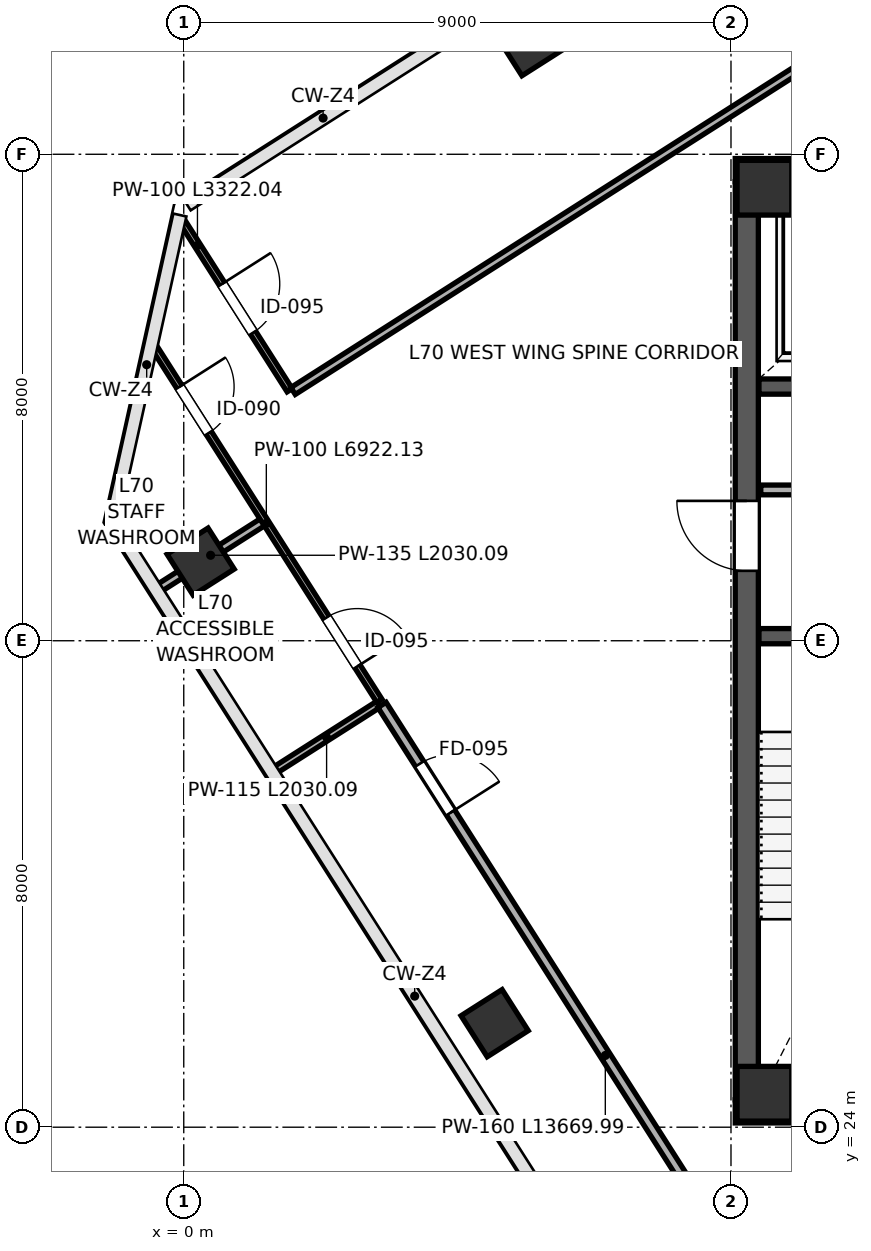
"""IFC4 building model, lengths in metres.
Left out: names, types, materials, properties, quantities, classifications, styles, units other than length and angle.
Written with IfcOpenShell. Run it as: python <this file> out.ifc"""

import sys

from ifc_helpers import new_model, si_unit, direction, frame, frame_2d, origin, origin_2d, place, context, subcontext, project, spatial, rectangle, extrude, source, transform, mapped, element, fill, save


model = new_model("IFC4")
c1 = context("Model", 3, precision=1e-05, world=origin(), true_north=direction((0.0, 1.0)))
c2 = subcontext(c1, "Body", "Model", "MODEL_VIEW")
j1 = project(units=[si_unit("LENGTHUNIT", "METRE"), si_unit("PLANEANGLEUNIT", "RADIAN")], contexts=[c1])
p1 = place(None, origin())
s1 = spatial("IfcSite", under=j1, at=p1, CompositionType="ELEMENT")
p2 = place(p1, origin())
s2 = spatial("IfcBuilding", under=s1, at=p2, CompositionType="ELEMENT")
p3 = place(p2, frame((0.0, 0.0, 311.4)))
s3 = spatial("IfcBuildingStorey", under=s2, at=p3, CompositionType="ELEMENT", Elevation=311.4)
m1 = source(origin(), c2, "Body", "SweptSolid", [
    extrude(rectangle(XDim=0.9, YDim=0.9, at=origin_2d()), origin(), (0.0, 0.0, 1.0), 4.199),
])
for number, where, z_axis, x_axis in (
    (1, (9.55, 24.55, 0.001), (0.0, 0.0, 1.0), (1.0, 0.0, 0.0)),
    (2, (9.55, 39.45, 0.001), (0.0, 0.0, 1.0), (1.0, 0.0, 0.0)),
):
    element("IfcColumn", number, at=place(p3, frame(where, z_axis=z_axis, x_axis=x_axis)), inside=s3, PredefinedType="COLUMN", context=c2, shape_type="MappedRepresentation", body=[
        mapped(m1, transform((0.0, 0.0, 0.0), scale=1.0)),
    ])
m2 = source(origin(), c2, "Body", "SweptSolid", [
    extrude(rectangle(XDim=0.8, YDim=0.8, at=origin_2d()), origin(), (0.0, 0.0, 1.0), 4.199),
])
for number, where, z_axis, x_axis in (
    (3, (0.277, 33.301, 0.001), (0.0, 0.0, 1.0), (-0.537, 0.843, 0.0)),
    (4, (5.113, 25.71, 0.001), (0.0, 0.0, 1.0), (-0.537, 0.843, 0.0)),
):
    element("IfcColumn", number, at=place(p3, frame(where, z_axis=z_axis, x_axis=x_axis)), inside=s3, PredefinedType="COLUMN", context=c2, shape_type="MappedRepresentation", body=[
        mapped(m2, transform((0.0, 0.0, 0.0), scale=1.0)),
    ])
m3 = source(origin(), c2, "Body", "SweptSolid", [
    extrude(rectangle(XDim=0.9, YDim=0.9, at=origin_2d()), origin(), (0.0, 0.0, 1.0), 4.199),
])
p4 = place(p3, frame((5.699, 41.913, 0.001), z_axis=(0.0, 0.0, 1.0), x_axis=(-0.537299608347, 0.843391445813, 0.0)))
e5 = element("IfcColumn", 5, at=p4, inside=s3, PredefinedType="COLUMN", context=c2, shape_type="MappedRepresentation", body=[
    mapped(m3, transform((0.0, 0.0, 0.0), scale=1.0)),
])
p5 = place(p3, frame((9.26, 24.45, 0.0), z_axis=(0.0, 0.0, 1.0), x_axis=(0.0, 1.0, 0.0)))
e6 = element("IfcWall", 6, at=p5, inside=s3, PredefinedType="SHEAR", context=c2, shape_type="SweptSolid", body=[
    extrude(rectangle(XDim=15.1, YDim=0.38, at=frame_2d((7.55, 0.0))), origin(), (0.0, 0.0, 1.0), 3.96),
])
p6 = place(p5, frame((8.7, 0.0, 0.0)))
e7 = element("IfcOpeningElement", 7, at=p6, cuts=e6, PredefinedType="OPENING", context=c2, shape_type="SweptSolid", body=[
    extrude(rectangle(XDim=1.15, YDim=2.2, at=frame_2d((0.575, 1.1))), frame((0.0, 0.2, 0.0), z_axis=(0.0, -1.0, 0.0), x_axis=(1.0, 0.0, 0.0)), (0.0, 0.0, 1.0), 0.4),
])
for number, where, z_axis, x_axis in (
    (8, (9.07, 24.26, 0.0), (0.0, 0.0, 1.0), (1.0, 0.0, 0.0)),
    (9, (9.07, 39.74, 0.0), (0.0, 0.0, 1.0), (1.0, 0.0, 0.0)),
):
    element("IfcWall", number, at=place(p3, frame(where, z_axis=z_axis, x_axis=x_axis)), inside=s3, PredefinedType="SHEAR", context=c2, shape_type="SweptSolid", body=[
        extrude(rectangle(XDim=17.86, YDim=0.38, at=frame_2d((8.93, 0.0))), origin(), (0.0, 0.0, 1.0), 3.96),
    ])
p7 = place(p3, frame((9.46, 32.075, 0.0), z_axis=(0.0, 0.0, 1.0), x_axis=(1.0, 0.0, 0.0)))
e10 = element("IfcWall", 10, at=p7, inside=s3, PredefinedType="SHEAR", context=c2, shape_type="SweptSolid", body=[
    extrude(rectangle(XDim=3.29, YDim=0.25, at=frame_2d((1.645, 0.0))), origin(), (0.0, 0.0, 1.0), 3.96),
])
p8 = place(p3, frame((9.46, 36.18, 0.0), z_axis=(0.0, 0.0, 1.0), x_axis=(1.0, 0.0, 0.0)))
e11 = element("IfcWall", 11, at=p8, inside=s3, PredefinedType="SHEAR", context=c2, shape_type="SweptSolid", body=[
    extrude(rectangle(XDim=3.79, YDim=0.25, at=frame_2d((1.895, 0.0))), origin(), (0.0, 0.0, 1.0), 3.96),
])
p9 = place(p8, frame((2.62, 0.0, 0.0)))
e12 = element("IfcOpeningElement", 12, at=p9, cuts=e11, PredefinedType="OPENING", context=c2, shape_type="SweptSolid", body=[
    extrude(rectangle(XDim=0.85, YDim=2.1, at=frame_2d((0.425, 1.05))), frame((0.0, 0.135, 0.0), z_axis=(0.0, -1.0, 0.0), x_axis=(1.0, 0.0, 0.0)), (0.0, 0.0, 1.0), 0.27),
])
p10 = place(p8, frame((0.85, 0.0, 0.0)))
e13 = element("IfcOpeningElement", 13, at=p10, cuts=e11, PredefinedType="OPENING", context=c2, shape_type="SweptSolid", body=[
    extrude(rectangle(XDim=1.3, YDim=2.25, at=frame_2d((0.65, 1.125))), frame((0.0, 0.135, 0.0), z_axis=(0.0, -1.0, 0.0), x_axis=(1.0, 0.0, 0.0)), (0.0, 0.0, 1.0), 0.27),
])
p11 = place(p3, frame((9.49, 34.48, 0.0), z_axis=(0.0, 0.0, 1.0), x_axis=(1.0, 0.0, 0.0)))
e14 = element("IfcWall", 14, at=p11, inside=s3, PredefinedType="PARTITIONING", context=c2, shape_type="SweptSolid", body=[
    extrude(rectangle(XDim=3.7, YDim=0.16, at=frame_2d((1.85, 0.0))), origin(), (0.0, 0.0, 1.0), 3.96),
])
p12 = place(p11, frame((1.15, 0.0, 0.0)))
e15 = element("IfcOpeningElement", 15, at=p12, cuts=e14, PredefinedType="OPENING", context=c2, shape_type="SweptSolid", body=[
    extrude(rectangle(XDim=0.9, YDim=2.15, at=frame_2d((0.45, 1.075))), frame((0.0, 0.09, 0.0), z_axis=(0.0, -1.0, 0.0), x_axis=(1.0, 0.0, 0.0)), (0.0, 0.0, 1.0), 0.18),
])
p13 = place(p3, frame((-0.414, 32.86, 0.0), z_axis=(0.0, 0.0, 1.0), x_axis=(0.843468317829, 0.5371789244, 0.0)))
e16 = element("IfcWall", 16, at=p13, inside=s3, PredefinedType="PARTITIONING", context=c2, shape_type="SweptSolid", body=[
    extrude(rectangle(XDim=2.03, YDim=0.135, at=frame_2d((1.015, 0.0))), origin(), (0.0, 0.0, 1.0), 3.295),
])
p14 = place(p3, frame((1.493, 29.866, 0.0), z_axis=(0.0, 0.0, 1.0), x_axis=(0.843433611632, 0.537233415537, 0.0)))
e17 = element("IfcWall", 17, at=p14, inside=s3, PredefinedType="PARTITIONING", context=c2, shape_type="SweptSolid", body=[
    extrude(rectangle(XDim=2.03, YDim=0.115, at=frame_2d((1.015, 0.0))), origin(), (0.0, 0.0, 1.0), 3.295),
])
p15 = place(p3, frame((-0.502, 36.85, 0.0), z_axis=(0.0, 0.0, 1.0), x_axis=(0.537309039539, -0.843385437407, 0.0)))
e18 = element("IfcWall", 18, at=p15, inside=s3, PredefinedType="PARTITIONING", context=c2, shape_type="SweptSolid", body=[
    extrude(rectangle(XDim=6.922, YDim=0.1, at=frame_2d((3.461, 0.0))), origin(), (0.0, 0.0, 1.0), 3.96),
])
p16 = place(p15, frame((0.8, 0.0, 0.0)))
e19 = element("IfcOpeningElement", 19, at=p16, cuts=e18, PredefinedType="OPENING", context=c2, shape_type="SweptSolid", body=[
    extrude(rectangle(XDim=0.9, YDim=2.15, at=frame_2d((0.45, 1.075))), frame((0.0, 0.06, 0.0), z_axis=(0.0, -1.0, 0.0), x_axis=(1.0, 0.0, 0.0)), (0.0, 0.0, 1.0), 0.12),
])
p17 = place(p15, frame((5.3, 0.0, 0.0)))
e20 = element("IfcOpeningElement", 20, at=p17, cuts=e18, PredefinedType="OPENING", context=c2, shape_type="SweptSolid", body=[
    extrude(rectangle(XDim=0.95, YDim=2.15, at=frame_2d((0.475, 1.075))), frame((0.0, 0.06, 0.0), z_axis=(0.0, -1.0, 0.0), x_axis=(1.0, 0.0, 0.0)), (0.0, 0.0, 1.0), 0.12),
])
p18 = place(p3, frame((3.26, 30.945, 0.0), z_axis=(0.0, 0.0, 1.0), x_axis=(0.537307625317, -0.843386338386, 0.0)))
e21 = element("IfcWall", 21, at=p18, inside=s3, PredefinedType="PARTITIONING", context=c2, shape_type="SweptSolid", body=[
    extrude(rectangle(XDim=13.67, YDim=0.16, at=frame_2d((6.835, 0.0))), origin(), (0.0, 0.0, 1.0), 3.96),
])
p19 = place(p18, frame((1.15, 0.0, 0.0)))
e22 = element("IfcOpeningElement", 22, at=p19, cuts=e21, PredefinedType="OPENING", context=c2, shape_type="SweptSolid", body=[
    extrude(rectangle(XDim=0.95, YDim=2.15, at=frame_2d((0.475, 1.075))), frame((0.0, 0.09, 0.0), z_axis=(0.0, -1.0, 0.0), x_axis=(1.0, 0.0, 0.0)), (0.0, 0.0, 1.0), 0.18),
])
p20 = place(p3, frame((-0.042, 38.921, 0.0), z_axis=(0.0, 0.0, 1.0), x_axis=(0.537298651026, -0.843392055693, 0.0)))
e23 = element("IfcWall", 23, at=p20, inside=s3, PredefinedType="PARTITIONING", context=c2, shape_type="SweptSolid", body=[
    extrude(rectangle(XDim=3.322, YDim=0.1, at=frame_2d((1.661, 0.0))), origin(), (0.0, 0.0, 1.0), 3.96),
])
p21 = place(p20, frame((1.25, 0.0, 0.0)))
e24 = element("IfcOpeningElement", 24, at=p21, cuts=e23, PredefinedType="OPENING", context=c2, shape_type="SweptSolid", body=[
    extrude(rectangle(XDim=0.95, YDim=2.15, at=frame_2d((0.475, 1.075))), frame((0.0, 0.06, 0.0), z_axis=(0.0, -1.0, 0.0), x_axis=(1.0, 0.0, 0.0)), (0.0, 0.0, 1.0), 0.12),
])
p22 = place(p3, frame((1.798, 36.107, 0.0), z_axis=(0.0, 0.0, 1.0), x_axis=(0.843396745572, 0.537291289301, 0.0)))
e25 = element("IfcWall", 25, at=p22, inside=s3, PredefinedType="PARTITIONING", context=c2, shape_type="SweptSolid", body=[
    extrude(rectangle(XDim=17.17, YDim=0.135, at=frame_2d((8.585, 0.0))), origin(), (0.0, 0.0, 1.0), 3.96),
])
p23 = place(p3, frame((9.687, 17.004, 0.0), z_axis=(0.0, 0.0, 1.0), x_axis=(0.843392646996, 0.537297722862, 0.0)))
e26 = element("IfcWall", 26, at=p23, inside=s3, PredefinedType="PARTITIONING", context=c2, shape_type="SweptSolid", body=[
    extrude(rectangle(XDim=12.831, YDim=0.16, at=frame_2d((6.416, 0.0))), origin(), (0.0, 0.0, 1.0), 3.96),
])
m4 = source(origin(), c2, "Body", "SweptSolid", [
    extrude(rectangle(XDim=1.15, YDim=2.2, at=frame_2d((0.575, 1.1))), frame((0.0, 0.025, 0.0), z_axis=(0.0, -1.0, 0.0), x_axis=(1.0, 0.0, 0.0)), (0.0, 0.0, 1.0), 0.05),
])
p24 = place(p6, origin())
e27 = element("IfcDoor", 27, at=p24, inside=s3, OperationType="SINGLE_SWING_RIGHT", PredefinedType="DOOR", context=c2, shape_type="MappedRepresentation", body=[
    mapped(m4, transform((0.0, 0.0, 0.0), scale=1.0)),
])
fill(e7, e27)
m5 = source(origin(), c2, "Body", "SweptSolid", [
    extrude(rectangle(XDim=0.9, YDim=2.15, at=frame_2d((0.45, 1.075))), frame((0.0, 0.025, 0.0), z_axis=(0.0, -1.0, 0.0), x_axis=(1.0, 0.0, 0.0)), (0.0, 0.0, 1.0), 0.05),
])
p25 = place(p16, origin())
e28 = element("IfcDoor", 28, at=p25, inside=s3, OperationType="SINGLE_SWING_LEFT", PredefinedType="DOOR", context=c2, shape_type="MappedRepresentation", body=[
    mapped(m5, transform((0.0, 0.0, 0.0), scale=1.0)),
])
fill(e19, e28)
m6 = source(origin(), c2, "Body", "SweptSolid", [
    extrude(rectangle(XDim=0.95, YDim=2.15, at=frame_2d((0.475, 1.075))), frame((0.0, 0.025, 0.0), z_axis=(0.0, -1.0, 0.0), x_axis=(1.0, 0.0, 0.0)), (0.0, 0.0, 1.0), 0.05),
])
p26 = place(p17, origin())
e29 = element("IfcDoor", 29, at=p26, inside=s3, OperationType="SINGLE_SWING_RIGHT", PredefinedType="DOOR", context=c2, shape_type="MappedRepresentation", body=[
    mapped(m6, transform((0.0, 0.0, 0.0), scale=1.0)),
])
fill(e20, e29)
m7 = source(origin(), c2, "Body", "SweptSolid", [
    extrude(rectangle(XDim=0.95, YDim=2.15, at=frame_2d((0.475, 1.075))), frame((0.0, 0.025, 0.0), z_axis=(0.0, -1.0, 0.0), x_axis=(1.0, 0.0, 0.0)), (0.0, 0.0, 1.0), 0.05),
])
p27 = place(p19, origin())
e30 = element("IfcDoor", 30, at=p27, inside=s3, OperationType="SINGLE_SWING_RIGHT", PredefinedType="DOOR", context=c2, shape_type="MappedRepresentation", body=[
    mapped(m7, transform((0.0, 0.0, 0.0), scale=1.0)),
])
fill(e22, e30)
p28 = place(p21, origin())
e31 = element("IfcDoor", 31, at=p28, inside=s3, OperationType="SINGLE_SWING_LEFT", PredefinedType="DOOR", context=c2, shape_type="MappedRepresentation", body=[
    mapped(m6, transform((0.0, 0.0, 0.0), scale=1.0)),
])
fill(e24, e31)
save(model, sys.argv[1])
